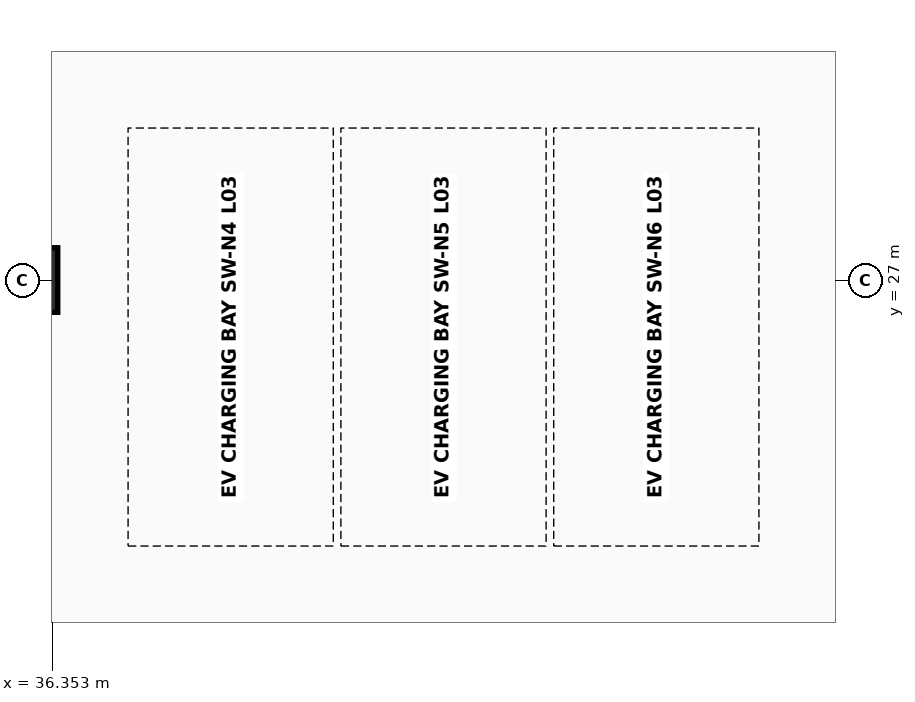
"""IFC4 building model, lengths in metres.
Left out: names, types, materials, properties, quantities, classifications, styles, units other than length and angle.
Written with IfcOpenShell. Run it as: python <this file> out.ifc"""

import sys

from ifc_helpers import new_model, si_unit, direction, frame, origin, origin_2d, place, context, subcontext, project, spatial, rectangle, extrude, element, save


model = new_model("IFC4")
c1 = context("Model", 3, precision=1e-05, world=origin(), true_north=direction((0.0, 1.0)))
c2 = subcontext(c1, "Body", "Model", "MODEL_VIEW")
j1 = project(units=[si_unit("LENGTHUNIT", "METRE"), si_unit("PLANEANGLEUNIT", "RADIAN")], contexts=[c1])
p1 = place(None, origin())
s1 = spatial("IfcSite", under=j1, at=p1, CompositionType="ELEMENT")
p2 = place(p1, origin())
s2 = spatial("IfcBuilding", under=s1, at=p2, CompositionType="ELEMENT")
p3 = place(p2, frame((0.0, 0.0, 13.4)))
s3 = spatial("IfcBuildingStorey", under=s2, at=p3, CompositionType="ELEMENT", Elevation=13.4)
p4 = place(p3, frame((36.0, 27.0, 0.0), z_axis=(0.0, 0.0, 1.0), x_axis=(1.0, 0.0, 0.0)))
e1 = element("IfcColumn", 1, at=p4, inside=s3, PredefinedType="COLUMN", context=c2, shape_type="SweptSolid", body=[
    extrude(rectangle(XDim=0.85, YDim=0.85, at=origin_2d()), origin(), (0.0, 0.0, 1.0), 3.8),
])
save(model, sys.argv[1])
